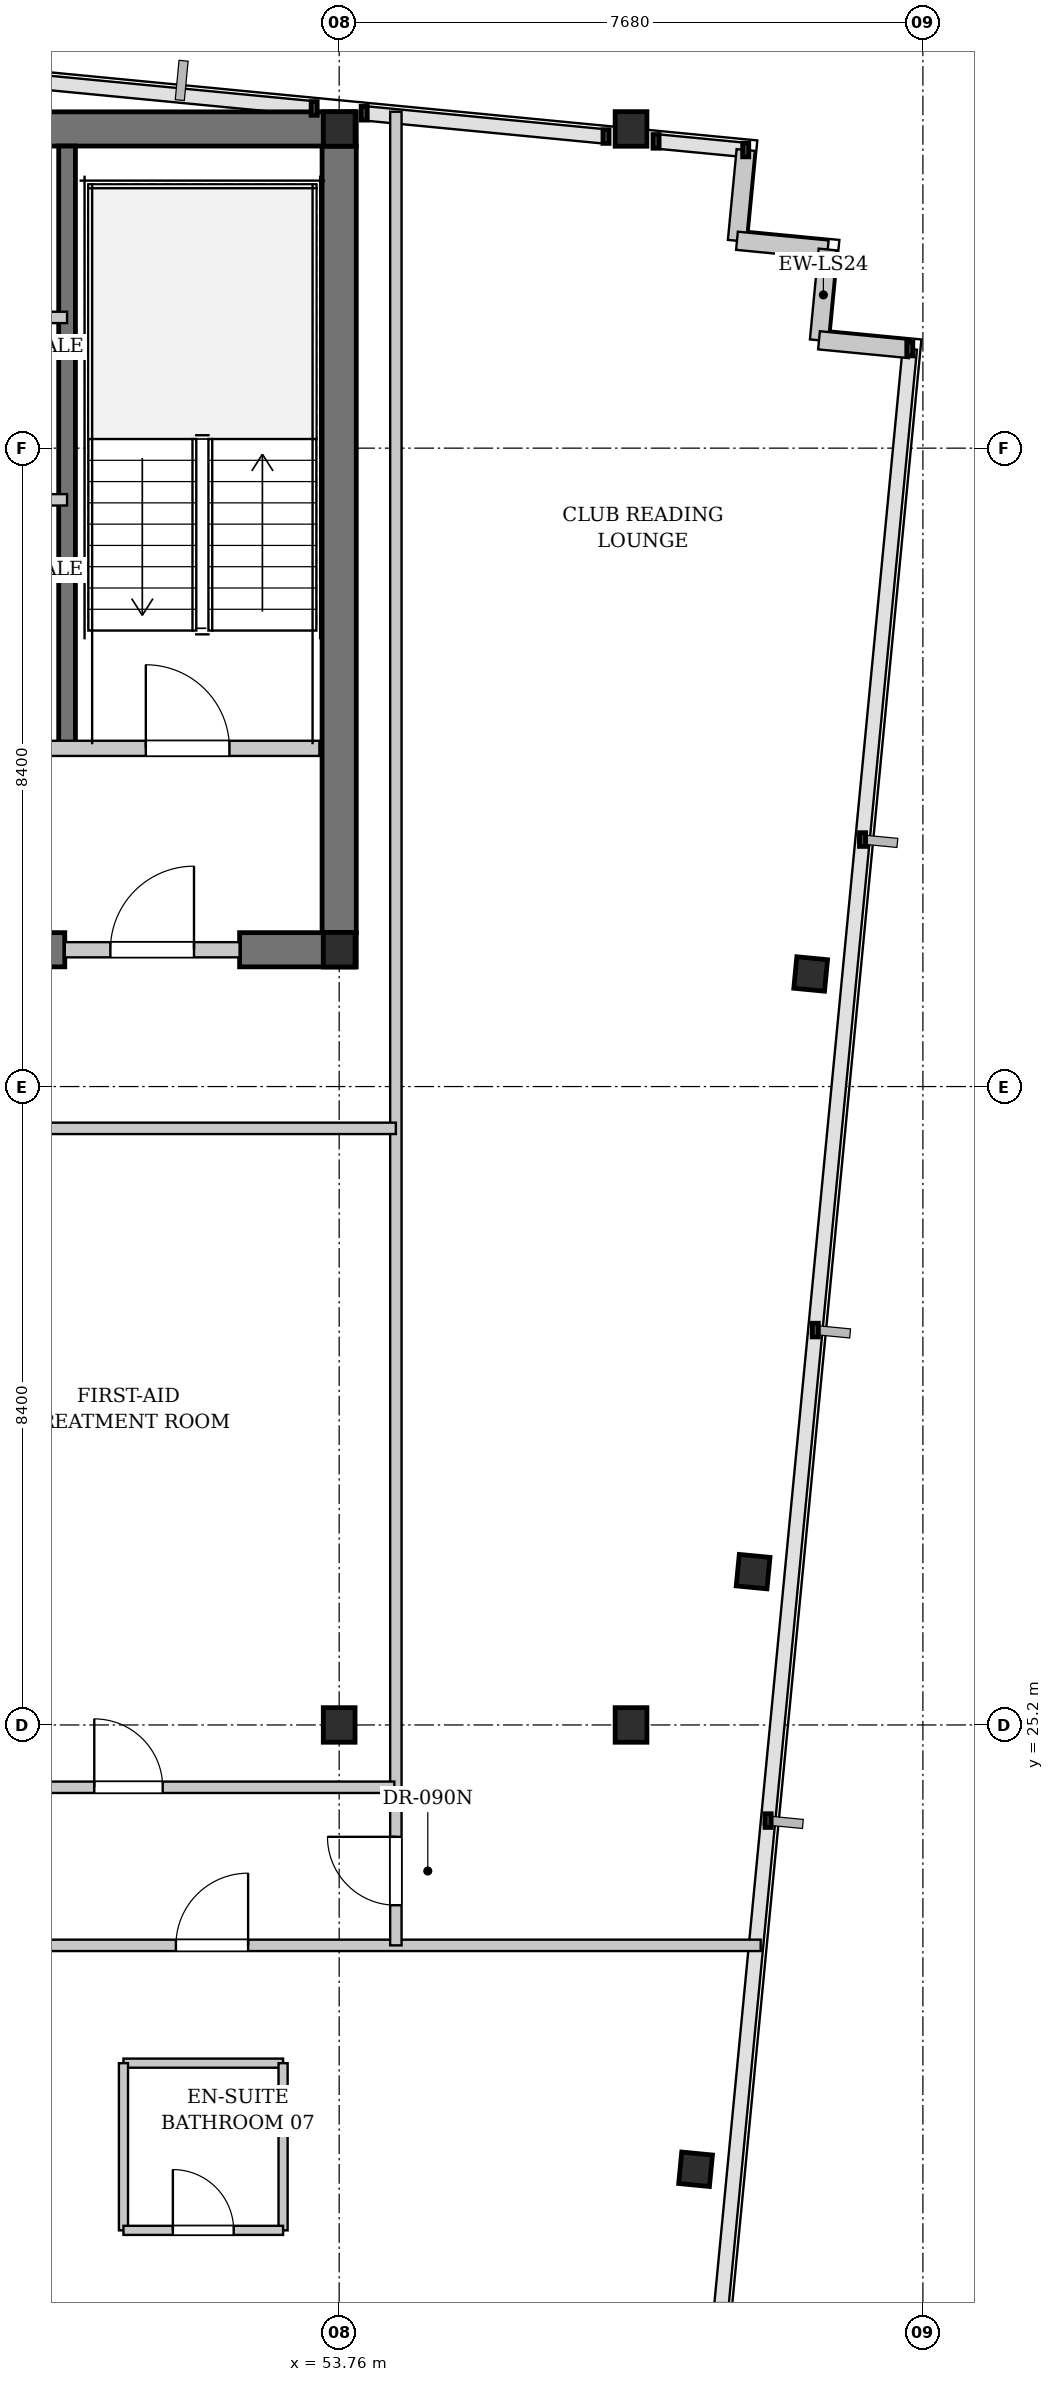
"""IFC4 building model, lengths in metres.
Left out: names, types, materials, properties, quantities, classifications, styles, units other than length and angle.
Written with IfcOpenShell. Run it as: python <this file> out.ifc"""

import sys

from ifc_helpers import new_model, si_unit, direction, frame, frame_2d, origin, origin_2d, place, context, subcontext, project, spatial, rectangle, i_section, extrude, element, fill, save


model = new_model("IFC4")
c1 = context("Model", 3, precision=1e-05, world=origin(), true_north=direction((0.0, 1.0)))
c2 = subcontext(c1, "Body", "Model", "MODEL_VIEW")
j1 = project(units=[si_unit("LENGTHUNIT", "METRE"), si_unit("PLANEANGLEUNIT", "RADIAN")], contexts=[c1])
p1 = place(None, origin())
s1 = spatial("IfcSite", under=j1, at=p1, CompositionType="ELEMENT")
p2 = place(p1, origin())
s2 = spatial("IfcBuilding", under=s1, at=p2, CompositionType="ELEMENT")
p3 = place(p2, frame((0.0, 0.0, 165.5)))
s3 = spatial("IfcBuildingStorey", under=s2, at=p3, CompositionType="ELEMENT", Elevation=165.5)
p4 = place(p3, frame((22.815, 46.2, 0.0), z_axis=(0.0, 0.0, 1.0), x_axis=(1.0, 0.0, 0.0)))
e1 = element("IfcWall", 1, at=p4, inside=s3, PredefinedType="SHEAR", context=c2, shape_type="SweptSolid", body=[
    extrude(rectangle(XDim=31.17, YDim=0.45, at=frame_2d((15.585, 0.0))), origin(), (0.0, 0.0, 1.0), 3.08),
])
p5 = place(p3, frame((42.1, 35.4, 0.0), z_axis=(0.0, 0.0, 1.0), x_axis=(1.0, 0.0, 0.0)))
e2 = element("IfcWall", 2, at=p5, inside=s3, PredefinedType="SHEAR", context=c2, shape_type="SweptSolid", body=[
    extrude(rectangle(XDim=8.05, YDim=0.45, at=frame_2d((4.025, 0.0))), origin(), (0.0, 0.0, 1.0), 3.08),
])
p6 = place(p5, frame((4.85, 0.0, 0.0)))
e3 = element("IfcOpeningElement", 3, at=p6, cuts=e2, PredefinedType="OPENING", context=c2, shape_type="SweptSolid", body=[
    extrude(rectangle(XDim=0.9, YDim=2.15, at=frame_2d((0.45, 1.075))), frame((0.0, 0.235, 0.0), z_axis=(0.0, -1.0, 0.0), x_axis=(1.0, 0.0, 0.0)), (0.0, 0.0, 1.0), 0.47),
])
p7 = place(p3, frame((52.45, 35.4, 0.0), z_axis=(0.0, 0.0, 1.0), x_axis=(1.0, 0.0, 0.0)))
e4 = element("IfcWall", 4, at=p7, inside=s3, PredefinedType="SHEAR", context=c2, shape_type="SweptSolid", body=[
    extrude(rectangle(XDim=1.535, YDim=0.45, at=frame_2d((0.768, 0.0))), origin(), (0.0, 0.0, 1.0), 3.08),
])
p8 = place(p3, frame((53.76, 35.625, 0.0), z_axis=(0.0, 0.0, 1.0), x_axis=(0.0, 1.0, 0.0)))
e5 = element("IfcWall", 5, at=p8, inside=s3, PredefinedType="SHEAR", context=c2, shape_type="SweptSolid", body=[
    extrude(rectangle(XDim=10.35, YDim=0.45, at=frame_2d((5.175, 0.0))), origin(), (0.0, 0.0, 1.0), 3.08),
])
p9 = place(p3, frame((50.18, 38.05, 0.0), z_axis=(0.0, 0.0, 1.0), x_axis=(0.0, 1.0, 0.0)))
e6 = element("IfcWall", 6, at=p9, inside=s3, PredefinedType="SHEAR", context=c2, shape_type="SweptSolid", body=[
    extrude(rectangle(XDim=7.925, YDim=0.22, at=frame_2d((3.962, 0.0))), origin(), (0.0, 0.0, 1.0), 3.08),
])
for number, where, z_axis, x_axis in (
    (7, (53.76, 35.4, 0.0), (0.0, 0.0, 1.0), (1.0, 0.0, 0.0)),
    (8, (53.76, 46.2, 0.0), (0.0, 0.0, 1.0), (1.0, 0.0, 0.0)),
    (9, (53.76, 25.2, 0.0), (0.0, 0.0, 1.0), (1.0, 0.0, 0.0)),
    (10, (57.6, 25.2, 0.0), (0.0, 0.0, 1.0), (1.0, 0.0, 0.0)),
    (11, (57.6, 46.2, 0.0), (0.0, 0.0, 1.0), (1.0, 0.0, 0.0)),
):
    element("IfcColumn", number, at=place(p3, frame(where, z_axis=z_axis, x_axis=x_axis)), inside=s3, PredefinedType="COLUMN", context=c2, shape_type="SweptSolid", body=[
        extrude(i_section(OverallWidth=0.418, OverallDepth=0.455, WebThickness=0.042, FlangeThickness=0.068, FilletRadius=0.015, at=origin_2d()), origin(), (0.0, 0.0, 1.0), 3.3),
    ])
for number, where, z_axis, x_axis in (
    (12, (58.449, 19.354, 0.0), (0.0, 0.0, 1.0), (0.995, -0.096, 0.0)),
    (13, (59.206, 27.218, 0.0), (0.0, 0.0, 1.0), (0.995, -0.096, 0.0)),
    (14, (59.963, 35.081, 0.0), (0.0, 0.0, 1.0), (0.995, -0.096, 0.0)),
):
    element("IfcColumn", number, at=place(p3, frame(where, z_axis=z_axis, x_axis=x_axis)), inside=s3, PredefinedType="COLUMN", context=c2, shape_type="SweptSolid", body=[
        extrude(i_section(OverallWidth=0.406, OverallDepth=0.416, WebThickness=0.03, FlangeThickness=0.048, FilletRadius=0.015, at=origin_2d()), origin(), (0.0, 0.0, 1.0), 3.3),
    ])
for number, where, z_axis, x_axis in (
    (15, (59.109, 45.923, 0.0), (0.0, 0.0, 1.0), (-0.096, -0.995, 0.0)),
    (16, (58.994, 44.729, 0.0), (0.0, 0.0, 1.0), (0.995, -0.096, 0.0)),
    (17, (60.188, 44.614, 0.0), (0.0, 0.0, 1.0), (-0.096, -0.995, 0.0)),
    (18, (60.073, 43.419, 0.0), (0.0, 0.0, 1.0), (0.995, -0.096, 0.0)),
):
    element("IfcWall", number, at=place(p3, frame(where, z_axis=z_axis, x_axis=x_axis)), inside=s3, PredefinedType="SOLIDWALL", context=c2, shape_type="SweptSolid", body=[
        extrude(rectangle(XDim=1.2, YDim=0.24, at=frame_2d((0.6, 0.0))), origin(), (0.0, 0.0, 1.0), 3.08),
    ])
p10 = place(p3, frame((49.78, 38.05, 0.0), z_axis=(0.0, 0.0, 1.0), x_axis=(1.0, 0.0, 0.0)))
e19 = element("IfcWall", 19, at=p10, inside=s3, PredefinedType="PARTITIONING", context=c2, shape_type="SweptSolid", body=[
    extrude(rectangle(XDim=3.72, YDim=0.2, at=frame_2d((1.86, 0.0))), origin(), (0.0, 0.0, 1.0), 3.08),
])
p11 = place(p10, frame((1.436, 0.0, 0.0)))
e20 = element("IfcOpeningElement", 20, at=p11, cuts=e19, PredefinedType="OPENING", context=c2, shape_type="SweptSolid", body=[
    extrude(rectangle(XDim=1.1, YDim=2.15, at=frame_2d((0.55, 1.075))), frame((0.0, 0.11, 0.0), z_axis=(0.0, -1.0, 0.0), x_axis=(1.0, 0.0, 0.0)), (0.0, 0.0, 1.0), 0.22),
])
p12 = place(p3, frame((50.15, 35.4, 0.0), z_axis=(0.0, 0.0, 1.0), x_axis=(1.0, 0.0, 0.0)))
e21 = element("IfcWall", 21, at=p12, inside=s3, PredefinedType="PARTITIONING", context=c2, shape_type="SweptSolid", body=[
    extrude(rectangle(XDim=2.3, YDim=0.2, at=frame_2d((1.15, 0.0))), origin(), (0.0, 0.0, 1.0), 2.475),
])
p13 = place(p12, frame((0.6, 0.0, 0.0)))
e22 = element("IfcOpeningElement", 22, at=p13, cuts=e21, PredefinedType="OPENING", context=c2, shape_type="SweptSolid", body=[
    extrude(rectangle(XDim=1.1, YDim=2.15, at=frame_2d((0.55, 1.075))), frame((0.0, 0.11, 0.0), z_axis=(0.0, -1.0, 0.0), x_axis=(1.0, 0.0, 0.0)), (0.0, 0.0, 1.0), 0.22),
])
p14 = place(p3, frame((45.68, 43.72, 0.0), z_axis=(0.0, 0.0, 1.0), x_axis=(1.0, 0.0, 0.0)))
e23 = element("IfcWall", 23, at=p14, inside=s3, PredefinedType="PARTITIONING", context=c2, shape_type="SweptSolid", body=[
    extrude(rectangle(XDim=4.5, YDim=0.15, at=frame_2d((2.25, 0.0))), origin(), (0.0, 0.0, 1.0), 3.08),
])
p15 = place(p14, frame((0.55, 0.0, 0.0)))
e24 = element("IfcOpeningElement", 24, at=p15, cuts=e23, PredefinedType="OPENING", context=c2, shape_type="SweptSolid", body=[
    extrude(rectangle(XDim=0.95, YDim=2.15, at=frame_2d((0.475, 1.075))), frame((0.0, 0.085, 0.0), z_axis=(0.0, -1.0, 0.0), x_axis=(1.0, 0.0, 0.0)), (0.0, 0.0, 1.0), 0.17),
])
p16 = place(p3, frame((47.88, 41.32, 0.0), z_axis=(0.0, 0.0, 1.0), x_axis=(1.0, 0.0, 0.0)))
e25 = element("IfcWall", 25, at=p16, inside=s3, PredefinedType="PARTITIONING", context=c2, shape_type="SweptSolid", body=[
    extrude(rectangle(XDim=2.3, YDim=0.15, at=frame_2d((1.15, 0.0))), origin(), (0.0, 0.0, 1.0), 3.08),
])
p17 = place(p3, frame((50.922, 20.75, 0.0), z_axis=(0.0, 0.0, 1.0), x_axis=(1.0, 0.0, 0.0)))
e26 = element("IfcWall", 26, at=p17, inside=s3, PredefinedType="PARTITIONING", context=c2, shape_type="SweptSolid", body=[
    extrude(rectangle(XDim=2.1, YDim=0.12, at=frame_2d((1.05, 0.0))), origin(), (0.0, 0.0, 1.0), 3.08),
])
for number, where, z_axis, x_axis in (
    (27, (50.922, 18.55, 0.0), (0.0, 0.0, 1.0), (0.0, 1.0, 0.0)),
    (28, (53.022, 18.55, 0.0), (0.0, 0.0, 1.0), (0.0, 1.0, 0.0)),
):
    element("IfcWall", number, at=place(p3, frame(where, z_axis=z_axis, x_axis=x_axis)), inside=s3, PredefinedType="PARTITIONING", context=c2, shape_type="SweptSolid", body=[
        extrude(rectangle(XDim=2.2, YDim=0.12, at=frame_2d((1.1, 0.0))), origin(), (0.0, 0.0, 1.0), 3.08),
    ])
p18 = place(p3, frame((50.922, 18.55, 0.0), z_axis=(0.0, 0.0, 1.0), x_axis=(1.0, 0.0, 0.0)))
e29 = element("IfcWall", 29, at=p18, inside=s3, PredefinedType="PARTITIONING", context=c2, shape_type="SweptSolid", body=[
    extrude(rectangle(XDim=2.1, YDim=0.12, at=frame_2d((1.05, 0.0))), origin(), (0.0, 0.0, 1.0), 3.08),
])
p19 = place(p18, frame((0.65, 0.0, 0.0)))
e30 = element("IfcOpeningElement", 30, at=p19, cuts=e29, PredefinedType="OPENING", context=c2, shape_type="SweptSolid", body=[
    extrude(rectangle(XDim=0.8, YDim=2.1, at=frame_2d((0.4, 1.05))), frame((0.0, 0.07, 0.0), z_axis=(0.0, -1.0, 0.0), x_axis=(1.0, 0.0, 0.0)), (0.0, 0.0, 1.0), 0.14),
])
p20 = place(p3, frame((1.801, 22.3, 0.0), z_axis=(0.0, 0.0, 1.0), x_axis=(1.0, 0.0, 0.0)))
e31 = element("IfcWall", 31, at=p20, inside=s3, PredefinedType="PARTITIONING", context=c2, shape_type="SweptSolid", body=[
    extrude(rectangle(XDim=57.505, YDim=0.15, at=frame_2d((28.752, 0.0))), origin(), (0.0, 0.0, 1.0), 3.08),
])
p21 = place(p20, frame((8.731, 0.0, 0.0)))
e32 = element("IfcOpeningElement", 32, at=p21, cuts=e31, PredefinedType="OPENING", context=c2, shape_type="SweptSolid", body=[
    extrude(rectangle(XDim=0.95, YDim=2.15, at=frame_2d((0.475, 1.075))), frame((0.0, 0.085, 0.0), z_axis=(0.0, -1.0, 0.0), x_axis=(1.0, 0.0, 0.0)), (0.0, 0.0, 1.0), 0.17),
])
p22 = place(p20, frame((13.714, 0.0, 0.0)))
e33 = element("IfcOpeningElement", 33, at=p22, cuts=e31, PredefinedType="OPENING", context=c2, shape_type="SweptSolid", body=[
    extrude(rectangle(XDim=0.95, YDim=2.15, at=frame_2d((0.475, 1.075))), frame((0.0, 0.085, 0.0), z_axis=(0.0, -1.0, 0.0), x_axis=(1.0, 0.0, 0.0)), (0.0, 0.0, 1.0), 0.17),
])
p23 = place(p20, frame((20.506, 0.0, 0.0)))
e34 = element("IfcOpeningElement", 34, at=p23, cuts=e31, PredefinedType="OPENING", context=c2, shape_type="SweptSolid", body=[
    extrude(rectangle(XDim=0.95, YDim=2.15, at=frame_2d((0.475, 1.075))), frame((0.0, 0.085, 0.0), z_axis=(0.0, -1.0, 0.0), x_axis=(1.0, 0.0, 0.0)), (0.0, 0.0, 1.0), 0.17),
])
p24 = place(p20, frame((28.808, 0.0, 0.0)))
e35 = element("IfcOpeningElement", 35, at=p24, cuts=e31, PredefinedType="OPENING", context=c2, shape_type="SweptSolid", body=[
    extrude(rectangle(XDim=0.95, YDim=2.15, at=frame_2d((0.475, 1.075))), frame((0.0, 0.085, 0.0), z_axis=(0.0, -1.0, 0.0), x_axis=(1.0, 0.0, 0.0)), (0.0, 0.0, 1.0), 0.17),
])
p25 = place(p20, frame((37.209, 0.0, 0.0)))
e36 = element("IfcOpeningElement", 36, at=p25, cuts=e31, PredefinedType="OPENING", context=c2, shape_type="SweptSolid", body=[
    extrude(rectangle(XDim=0.95, YDim=2.15, at=frame_2d((0.475, 1.075))), frame((0.0, 0.085, 0.0), z_axis=(0.0, -1.0, 0.0), x_axis=(1.0, 0.0, 0.0)), (0.0, 0.0, 1.0), 0.17),
])
p26 = place(p20, frame((44.343, 0.0, 0.0)))
e37 = element("IfcOpeningElement", 37, at=p26, cuts=e31, PredefinedType="OPENING", context=c2, shape_type="SweptSolid", body=[
    extrude(rectangle(XDim=0.95, YDim=2.15, at=frame_2d((0.475, 1.075))), frame((0.0, 0.085, 0.0), z_axis=(0.0, -1.0, 0.0), x_axis=(1.0, 0.0, 0.0)), (0.0, 0.0, 1.0), 0.17),
])
p27 = place(p20, frame((49.811, 0.0, 0.0)))
e38 = element("IfcOpeningElement", 38, at=p27, cuts=e31, PredefinedType="OPENING", context=c2, shape_type="SweptSolid", body=[
    extrude(rectangle(XDim=0.95, YDim=2.15, at=frame_2d((0.475, 1.075))), frame((0.0, 0.085, 0.0), z_axis=(0.0, -1.0, 0.0), x_axis=(1.0, 0.0, 0.0)), (0.0, 0.0, 1.0), 0.17),
])
p28 = place(p3, frame((54.506, 22.3, 0.0), z_axis=(0.0, 0.0, 1.0), x_axis=(0.0, 1.0, 0.0)))
e39 = element("IfcWall", 39, at=p28, inside=s3, PredefinedType="PARTITIONING", context=c2, shape_type="SweptSolid", body=[
    extrude(rectangle(XDim=24.126, YDim=0.15, at=frame_2d((12.063, 0.0))), origin(), (0.0, 0.0, 1.0), 3.08),
])
p29 = place(p28, frame((0.528, 0.0, 0.0)))
e40 = element("IfcOpeningElement", 40, at=p29, cuts=e39, PredefinedType="OPENING", context=c2, shape_type="SweptSolid", body=[
    extrude(rectangle(XDim=0.9, YDim=2.15, at=frame_2d((0.45, 1.075))), frame((0.0, 0.085, 0.0), z_axis=(0.0, -1.0, 0.0), x_axis=(1.0, 0.0, 0.0)), (0.0, 0.0, 1.0), 0.17),
])
p30 = place(p3, frame((47.48, 33.05, 0.0), z_axis=(0.0, 0.0, 1.0), x_axis=(1.0, 0.0, 0.0)))
e41 = element("IfcWall", 41, at=p30, inside=s3, PredefinedType="PARTITIONING", context=c2, shape_type="SweptSolid", body=[
    extrude(rectangle(XDim=7.026, YDim=0.15, at=frame_2d((3.513, 0.0))), origin(), (0.0, 0.0, 1.0), 3.08),
])
p31 = place(p3, frame((47.49, 24.38, 0.0), z_axis=(0.0, 0.0, 1.0), x_axis=(1.0, 0.0, 0.0)))
e42 = element("IfcWall", 42, at=p31, inside=s3, PredefinedType="PARTITIONING", context=c2, shape_type="SweptSolid", body=[
    extrude(rectangle(XDim=6.996, YDim=0.15, at=frame_2d((3.498, 0.0))), origin(), (0.0, 0.0, 1.0), 3.08),
])
p32 = place(p31, frame((3.048, 0.0, 0.0)))
e43 = element("IfcOpeningElement", 43, at=p32, cuts=e42, PredefinedType="OPENING", context=c2, shape_type="SweptSolid", body=[
    extrude(rectangle(XDim=0.9, YDim=2.15, at=frame_2d((0.45, 1.075))), frame((0.0, 0.085, 0.0), z_axis=(0.0, -1.0, 0.0), x_axis=(1.0, 0.0, 0.0)), (0.0, 0.0, 1.0), 0.17),
])
p33 = place(p11, origin())
e44 = element("IfcDoor", 44, at=p33, inside=s3, OperationType="SINGLE_SWING_LEFT", PredefinedType="DOOR", context=c2, shape_type="SweptSolid", body=[
    extrude(rectangle(XDim=1.1, YDim=2.15, at=frame_2d((0.55, 1.075))), frame((0.0, 0.025, 0.0), z_axis=(0.0, -1.0, 0.0), x_axis=(1.0, 0.0, 0.0)), (0.0, 0.0, 1.0), 0.05),
])
fill(e20, e44)
p34 = place(p13, origin())
e45 = element("IfcDoor", 45, at=p34, inside=s3, OperationType="SINGLE_SWING_RIGHT", PredefinedType="DOOR", context=c2, shape_type="SweptSolid", body=[
    extrude(rectangle(XDim=1.1, YDim=2.15, at=frame_2d((0.55, 1.075))), frame((0.0, 0.025, 0.0), z_axis=(0.0, -1.0, 0.0), x_axis=(1.0, 0.0, 0.0)), (0.0, 0.0, 1.0), 0.05),
])
fill(e22, e45)
p35 = place(p19, origin())
e46 = element("IfcDoor", 46, at=p35, inside=s3, OperationType="SINGLE_SWING_LEFT", PredefinedType="DOOR", context=c2, shape_type="SweptSolid", body=[
    extrude(rectangle(XDim=0.8, YDim=2.1, at=frame_2d((0.4, 1.05))), frame((0.0, 0.025, 0.0), z_axis=(0.0, -1.0, 0.0), x_axis=(1.0, 0.0, 0.0)), (0.0, 0.0, 1.0), 0.05),
])
fill(e30, e46)
p36 = place(p27, origin())
e47 = element("IfcDoor", 47, at=p36, inside=s3, OperationType="SINGLE_SWING_RIGHT", PredefinedType="DOOR", context=c2, shape_type="SweptSolid", body=[
    extrude(rectangle(XDim=0.95, YDim=2.15, at=frame_2d((0.475, 1.075))), frame((0.0, 0.025, 0.0), z_axis=(0.0, -1.0, 0.0), x_axis=(1.0, 0.0, 0.0)), (0.0, 0.0, 1.0), 0.05),
])
fill(e38, e47)
p37 = place(p29, origin())
e48 = element("IfcDoor", 48, at=p37, inside=s3, OperationType="SINGLE_SWING_RIGHT", PredefinedType="DOOR", context=c2, shape_type="SweptSolid", body=[
    extrude(rectangle(XDim=0.9, YDim=2.15, at=frame_2d((0.45, 1.075))), frame((0.0, 0.025, 0.0), z_axis=(0.0, -1.0, 0.0), x_axis=(1.0, 0.0, 0.0)), (0.0, 0.0, 1.0), 0.05),
])
fill(e40, e48)
p38 = place(p32, origin())
e49 = element("IfcDoor", 49, at=p38, inside=s3, OperationType="SINGLE_SWING_LEFT", PredefinedType="DOOR", context=c2, shape_type="SweptSolid", body=[
    extrude(rectangle(XDim=0.9, YDim=2.15, at=frame_2d((0.45, 1.075))), frame((0.0, 0.025, 0.0), z_axis=(0.0, -1.0, 0.0), x_axis=(1.0, 0.0, 0.0)), (0.0, 0.0, 1.0), 0.05),
])
fill(e43, e49)
save(model, sys.argv[1])
